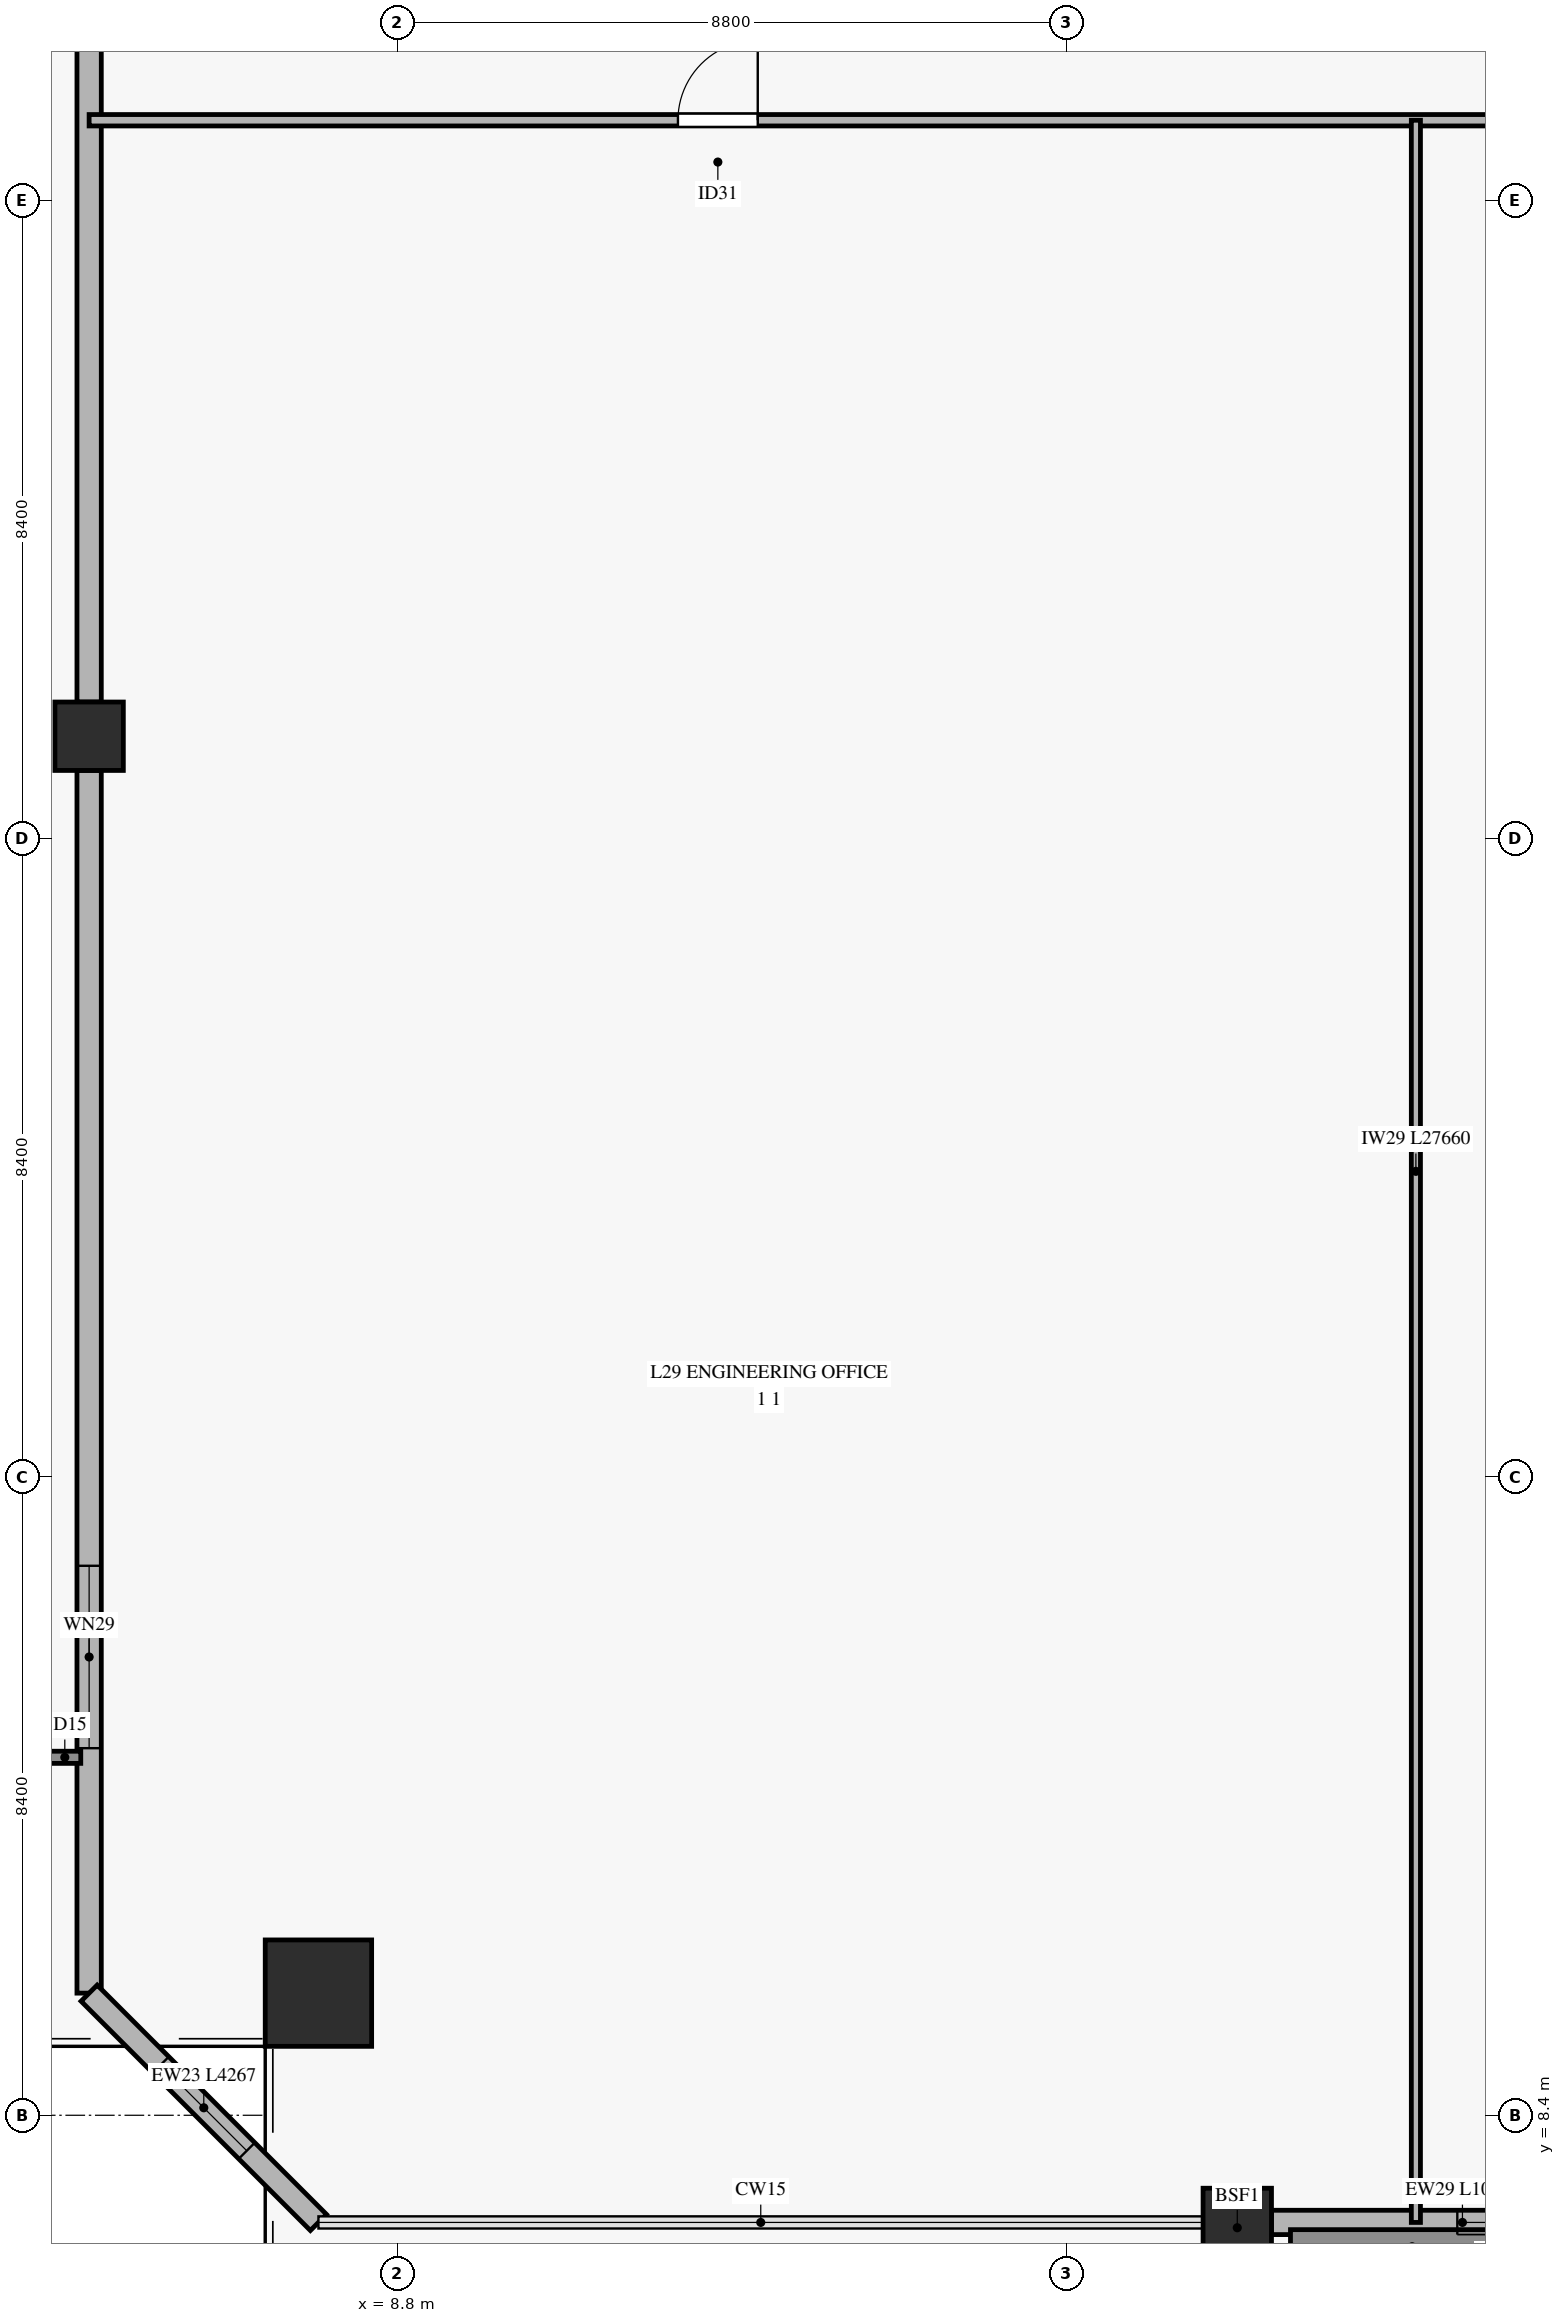
"""IFC4 building model, lengths in metres.
Left out: names, types, materials, properties, quantities, classifications, styles, units other than length and angle.
Written with IfcOpenShell. Run it as: python <this file> out.ifc"""

import sys

from ifc_helpers import new_model, si_unit, direction, frame, frame_2d, origin, origin_2d, place, context, subcontext, project, spatial, rectangle, hollow_rectangle, extrude, source, transform, mapped, element, fill, save


model = new_model("IFC4")
c1 = context("Model", 3, precision=1e-05, world=origin(), true_north=direction((0.0, 1.0)))
c2 = subcontext(c1, "Body", "Model", "MODEL_VIEW")
j1 = project(units=[si_unit("LENGTHUNIT", "METRE"), si_unit("PLANEANGLEUNIT", "RADIAN")], contexts=[c1])
p1 = place(None, origin())
s1 = spatial("IfcSite", under=j1, at=p1, CompositionType="ELEMENT")
p2 = place(p1, origin())
s2 = spatial("IfcBuilding", under=s1, at=p2, CompositionType="ELEMENT")
p3 = place(p2, frame((0.0, 0.0, 119.2)))
s3 = spatial("IfcBuildingStorey", under=s2, at=p3, CompositionType="ELEMENT", Elevation=119.2)
m1 = source(origin(), c2, "Body", "SweptSolid", [
    extrude(hollow_rectangle(XDim=1.4, YDim=1.4, WallThickness=0.065, at=origin_2d()), origin(), (0.0, 0.0, 1.0), 3.72),
])
p4 = place(p3, frame((7.761, 10.007, 0.0), z_axis=(0.056180364921, 0.134937885839, 0.989260093991), x_axis=(-0.923183164535, 0.384360305857, 0.0)))
e1 = element("IfcColumn", 1, at=p4, inside=s3, PredefinedType="COLUMN", context=c2, shape_type="MappedRepresentation", body=[
    mapped(m1, transform((0.0, 0.0, 0.0), x_axis=(1.0, 0.0, 0.0), y_axis=(0.0, 1.0, 0.0), z_axis=(0.0, 0.0, 1.0), scale=1.0)),
])
m2 = source(origin(), c2, "Body", "SweptSolid", [
    extrude(hollow_rectangle(XDim=0.9, YDim=0.9, WallThickness=0.04, at=origin_2d()), origin(), (0.0, 0.0, 1.0), 3.718),
])
p5 = place(p3, frame((19.85, 6.99, 0.0), z_axis=(0.0, 0.142046516587, 0.989859983596), x_axis=(-1.0, 0.0, 0.0)))
e2 = element("IfcColumn", 2, at=p5, inside=s3, PredefinedType="COLUMN", context=c2, shape_type="MappedRepresentation", body=[
    mapped(m2, transform((0.0, 0.0, 0.0), x_axis=(1.0, 0.0, 0.0), y_axis=(0.0, 1.0, 0.0), z_axis=(0.0, 0.0, 1.0), scale=1.0)),
])
m3 = source(origin(), c2, "Body", "SweptSolid", [
    extrude(hollow_rectangle(XDim=0.9, YDim=0.9, WallThickness=0.04, at=origin_2d()), origin(), (0.0, 0.0, 1.0), 3.697),
])
p6 = place(p3, frame((4.744, 26.545, 0.0), z_axis=(0.063596100828, 0.07145480903, 0.995414359062), x_axis=(-0.746990181356, 0.664835068989, 0.0)))
e3 = element("IfcColumn", 3, at=p6, inside=s3, PredefinedType="COLUMN", context=c2, shape_type="MappedRepresentation", body=[
    mapped(m3, transform((0.0, 0.0, 0.0), x_axis=(1.0, 0.0, 0.0), y_axis=(0.0, 1.0, 0.0), z_axis=(0.0, 0.0, 1.0), scale=1.0)),
])
p7 = place(p3, frame((20.3, 6.99, 0.0), z_axis=(0.0, 0.0, 1.0), x_axis=(1.0, 0.0, 0.0)))
e4 = element("IfcWall", 4, at=p7, inside=s3, PredefinedType="SOLIDWALL", context=c2, shape_type="SweptSolid", body=[
    extrude(rectangle(XDim=10.05, YDim=0.32, at=frame_2d((5.025, 0.0))), origin(), (0.0, 0.0, 1.0), 3.16),
])
p8 = place(p7, frame((4.1, 0.0, 0.0)))
e5 = element("IfcOpeningElement", 5, at=p8, cuts=e4, PredefinedType="OPENING", context=c2, shape_type="SweptSolid", body=[
    extrude(rectangle(XDim=1.8, YDim=2.25, at=frame_2d((0.9, 1.125))), frame((0.0, 0.17, 0.0), z_axis=(0.0, -1.0, 0.0), x_axis=(1.0, 0.0, 0.0)), (0.0, 0.0, 1.0), 0.34),
])
p9 = place(p7, frame((2.445, 0.0, 0.45)))
e6 = element("IfcOpeningElement", 6, at=p9, cuts=e4, PredefinedType="OPENING", context=c2, shape_type="SweptSolid", body=[
    extrude(rectangle(XDim=1.2, YDim=2.0, at=frame_2d((0.6, 1.0))), frame((0.0, 0.17, 0.0), z_axis=(0.0, -1.0, 0.0), x_axis=(1.0, 0.0, 0.0)), (0.0, 0.0, 1.0), 0.34),
])
p10 = place(p7, frame((6.5, 0.0, 0.45)))
e7 = element("IfcOpeningElement", 7, at=p10, cuts=e4, PredefinedType="OPENING", context=c2, shape_type="SweptSolid", body=[
    extrude(rectangle(XDim=1.6, YDim=2.0, at=frame_2d((0.8, 1.0))), frame((0.0, 0.17, 0.0), z_axis=(0.0, -1.0, 0.0), x_axis=(1.0, 0.0, 0.0)), (0.0, 0.0, 1.0), 0.34),
])
p11 = place(p3, frame((4.744, 10.007, 0.0), z_axis=(0.0, 0.0, 1.0), x_axis=(0.0, 1.0, 0.0)))
e8 = element("IfcWall", 8, at=p11, inside=s3, PredefinedType="SOLIDWALL", context=c2, shape_type="SweptSolid", body=[
    extrude(rectangle(XDim=16.088, YDim=0.32, at=frame_2d((8.044, 0.0))), origin(), (0.0, 0.0, 1.0), 3.16),
])
p12 = place(p11, frame((3.223, 0.0, 0.45)))
e9 = element("IfcOpeningElement", 9, at=p12, cuts=e8, PredefinedType="OPENING", context=c2, shape_type="SweptSolid", body=[
    extrude(rectangle(XDim=2.4, YDim=2.1, at=frame_2d((1.2, 1.05))), frame((0.0, 0.17, 0.0), z_axis=(0.0, -1.0, 0.0), x_axis=(1.0, 0.0, 0.0)), (0.0, 0.0, 1.0), 0.34),
])
p13 = place(p3, frame((4.744, 26.995, 0.0), z_axis=(0.0, 0.0, 1.0), x_axis=(0.0, 1.0, 0.0)))
e10 = element("IfcWall", 10, at=p13, inside=s3, PredefinedType="SOLIDWALL", context=c2, shape_type="SweptSolid", body=[
    extrude(rectangle(XDim=16.088, YDim=0.32, at=frame_2d((8.044, 0.0))), origin(), (0.0, 0.0, 1.0), 3.16),
])
p14 = place(p13, frame((10.86, 0.0, 0.45)))
e11 = element("IfcOpeningElement", 11, at=p14, cuts=e10, PredefinedType="OPENING", context=c2, shape_type="SweptSolid", body=[
    extrude(rectangle(XDim=2.4, YDim=2.1, at=frame_2d((1.2, 1.05))), frame((0.0, 0.17, 0.0), z_axis=(0.0, -1.0, 0.0), x_axis=(1.0, 0.0, 0.0)), (0.0, 0.0, 1.0), 0.34),
])
p15 = place(p3, frame((4.744, 10.007, 0.0), z_axis=(0.0, 0.0, 1.0), x_axis=(0.707106781187, -0.707106781187, 0.0)))
e12 = element("IfcWall", 12, at=p15, inside=s3, PredefinedType="SOLIDWALL", context=c2, shape_type="SweptSolid", body=[
    extrude(rectangle(XDim=4.267, YDim=0.3, at=frame_2d((2.133, 0.0))), origin(), (0.0, 0.0, 1.0), 3.16),
])
p16 = place(p15, frame((1.333, 0.0, 0.45)))
e13 = element("IfcOpeningElement", 13, at=p16, cuts=e12, PredefinedType="OPENING", context=c2, shape_type="SweptSolid", body=[
    extrude(rectangle(XDim=1.6, YDim=2.0, at=frame_2d((0.8, 1.0))), frame((0.0, 0.16, 0.0), z_axis=(0.0, -1.0, 0.0), x_axis=(1.0, 0.0, 0.0)), (0.0, 0.0, 1.0), 0.32),
])
p17 = place(p3, frame((4.744, 34.65, 0.0), z_axis=(0.0, 0.0, 1.0), x_axis=(1.0, 0.0, 0.0)))
e14 = element("IfcWall", 14, at=p17, inside=s3, PredefinedType="PARTITIONING", context=c2, shape_type="SweptSolid", body=[
    extrude(rectangle(XDim=60.912, YDim=0.15, at=frame_2d((30.456, 0.0))), origin(), (0.0, 0.0, 1.0), 2.765),
])
p18 = place(p17, frame((7.747, 0.0, 0.0)))
e15 = element("IfcOpeningElement", 15, at=p18, cuts=e14, PredefinedType="OPENING", context=c2, shape_type="SweptSolid", body=[
    extrude(rectangle(XDim=1.05, YDim=2.15, at=frame_2d((0.525, 1.075))), frame((0.0, 0.085, 0.0), z_axis=(0.0, -1.0, 0.0), x_axis=(1.0, 0.0, 0.0)), (0.0, 0.0, 1.0), 0.17),
])
p19 = place(p17, frame((20.391, 0.0, 0.0)))
e16 = element("IfcOpeningElement", 16, at=p19, cuts=e14, PredefinedType="OPENING", context=c2, shape_type="SweptSolid", body=[
    extrude(rectangle(XDim=1.05, YDim=2.15, at=frame_2d((0.525, 1.075))), frame((0.0, 0.085, 0.0), z_axis=(0.0, -1.0, 0.0), x_axis=(1.0, 0.0, 0.0)), (0.0, 0.0, 1.0), 0.17),
])
p20 = place(p17, frame((26.622, 0.0, 0.0)))
e17 = element("IfcOpeningElement", 17, at=p20, cuts=e14, PredefinedType="OPENING", context=c2, shape_type="SweptSolid", body=[
    extrude(rectangle(XDim=1.05, YDim=2.15, at=frame_2d((0.525, 1.075))), frame((0.0, 0.085, 0.0), z_axis=(0.0, -1.0, 0.0), x_axis=(1.0, 0.0, 0.0)), (0.0, 0.0, 1.0), 0.17),
])
p21 = place(p17, frame((32.462, 0.0, 0.0)))
e18 = element("IfcOpeningElement", 18, at=p21, cuts=e14, PredefinedType="OPENING", context=c2, shape_type="SweptSolid", body=[
    extrude(rectangle(XDim=1.05, YDim=2.15, at=frame_2d((0.525, 1.075))), frame((0.0, 0.085, 0.0), z_axis=(0.0, -1.0, 0.0), x_axis=(1.0, 0.0, 0.0)), (0.0, 0.0, 1.0), 0.17),
])
p22 = place(p17, frame((37.919, 0.0, 0.0)))
e19 = element("IfcOpeningElement", 19, at=p22, cuts=e14, PredefinedType="OPENING", context=c2, shape_type="SweptSolid", body=[
    extrude(rectangle(XDim=1.05, YDim=2.15, at=frame_2d((0.525, 1.075))), frame((0.0, 0.085, 0.0), z_axis=(0.0, -1.0, 0.0), x_axis=(1.0, 0.0, 0.0)), (0.0, 0.0, 1.0), 0.17),
])
p23 = place(p17, frame((48.75, 0.0, 0.0)))
e20 = element("IfcOpeningElement", 20, at=p23, cuts=e14, PredefinedType="OPENING", context=c2, shape_type="SweptSolid", body=[
    extrude(rectangle(XDim=1.05, YDim=2.15, at=frame_2d((0.525, 1.075))), frame((0.0, 0.085, 0.0), z_axis=(0.0, -1.0, 0.0), x_axis=(1.0, 0.0, 0.0)), (0.0, 0.0, 1.0), 0.17),
])
p24 = place(p3, frame((22.2, 6.99, 0.0), z_axis=(0.0, 0.0, 1.0), x_axis=(0.0, 1.0, 0.0)))
e21 = element("IfcWall", 21, at=p24, inside=s3, PredefinedType="PARTITIONING", context=c2, shape_type="SweptSolid", body=[
    extrude(rectangle(XDim=27.66, YDim=0.12, at=frame_2d((13.83, 0.0))), origin(), (0.0, 0.0, 1.0), 3.165),
])
m4 = source(origin(), c2, "Body", "SweptSolid", [
    extrude(rectangle(XDim=1.2, YDim=2.0, at=frame_2d((0.6, 1.0))), frame((0.0, 0.03, 0.0), z_axis=(0.0, -1.0, 0.0), x_axis=(1.0, 0.0, 0.0)), (0.0, 0.0, 1.0), 0.06),
])
p25 = place(p9, origin())
e22 = element("IfcWindow", 22, at=p25, inside=s3, PartitioningType="SINGLE_PANEL", PredefinedType="WINDOW", context=c2, shape_type="MappedRepresentation", body=[
    mapped(m4, transform((0.0, 0.0, 0.0), x_axis=(1.0, 0.0, 0.0), y_axis=(0.0, 1.0, 0.0), z_axis=(0.0, 0.0, 1.0), scale=1.0)),
])
fill(e6, e22)
m5 = source(origin(), c2, "Body", "SweptSolid", [
    extrude(rectangle(XDim=2.4, YDim=2.1, at=frame_2d((1.2, 1.05))), frame((0.0, 0.03, 0.0), z_axis=(0.0, -1.0, 0.0), x_axis=(1.0, 0.0, 0.0)), (0.0, 0.0, 1.0), 0.06),
])
p26 = place(p12, origin())
e23 = element("IfcWindow", 23, at=p26, inside=s3, PartitioningType="SINGLE_PANEL", PredefinedType="WINDOW", context=c2, shape_type="MappedRepresentation", body=[
    mapped(m5, transform((0.0, 0.0, 0.0), x_axis=(1.0, 0.0, 0.0), y_axis=(0.0, 1.0, 0.0), z_axis=(0.0, 0.0, 1.0), scale=1.0)),
])
fill(e9, e23)
m6 = source(origin(), c2, "Body", "SweptSolid", [
    extrude(rectangle(XDim=1.6, YDim=2.0, at=frame_2d((0.8, 1.0))), frame((0.0, 0.03, 0.0), z_axis=(0.0, -1.0, 0.0), x_axis=(1.0, 0.0, 0.0)), (0.0, 0.0, 1.0), 0.06),
])
p27 = place(p16, origin())
e24 = element("IfcWindow", 24, at=p27, inside=s3, PartitioningType="SINGLE_PANEL", PredefinedType="WINDOW", context=c2, shape_type="MappedRepresentation", body=[
    mapped(m6, transform((0.0, 0.0, 0.0), x_axis=(1.0, 0.0, 0.0), y_axis=(0.0, 1.0, 0.0), z_axis=(0.0, 0.0, 1.0), scale=1.0)),
])
fill(e13, e24)
m7 = source(origin(), c2, "Body", "SweptSolid", [
    extrude(rectangle(XDim=1.05, YDim=2.15, at=frame_2d((0.525, 1.075))), frame((0.0, 0.025, 0.0), z_axis=(0.0, -1.0, 0.0), x_axis=(1.0, 0.0, 0.0)), (0.0, 0.0, 1.0), 0.05),
])
p28 = place(p18, origin())
e25 = element("IfcDoor", 25, at=p28, inside=s3, OperationType="SINGLE_SWING_RIGHT", PredefinedType="DOOR", context=c2, shape_type="MappedRepresentation", body=[
    mapped(m7, transform((0.0, 0.0, 0.0), x_axis=(1.0, 0.0, 0.0), y_axis=(0.0, 1.0, 0.0), z_axis=(0.0, 0.0, 1.0), scale=1.0)),
])
fill(e15, e25)
save(model, sys.argv[1])
